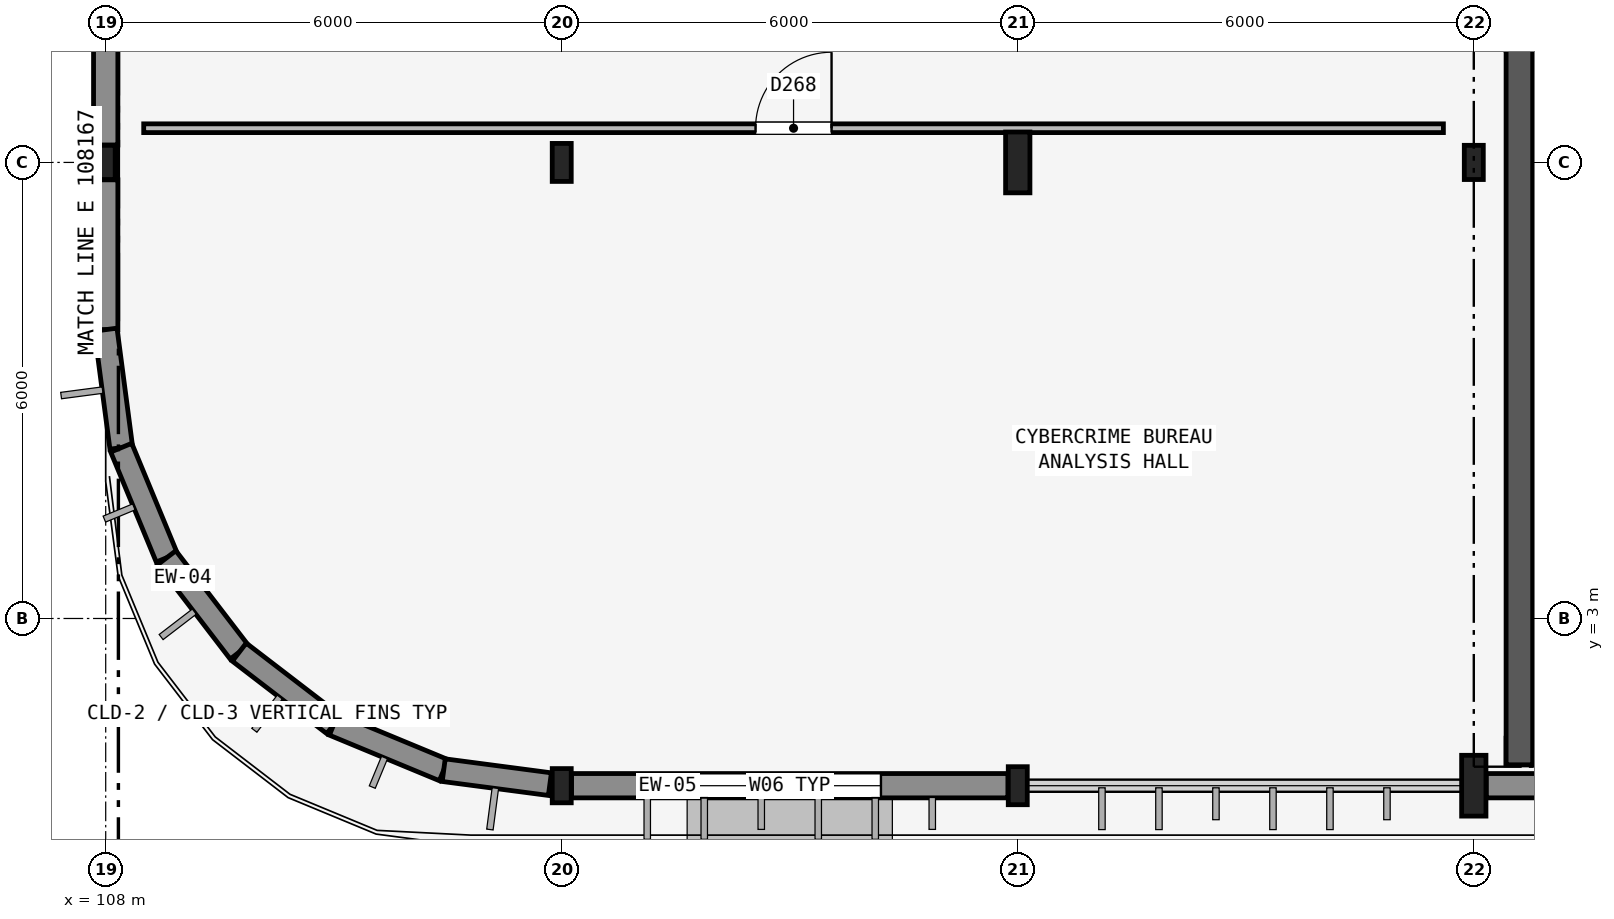
"""IFC4 building model, lengths in metres.
Left out: names, types, materials, properties, quantities, classifications, styles, units other than length and angle.
Written with IfcOpenShell. Run it as: python <this file> out.ifc"""

import sys

from ifc_helpers import new_model, si_unit, direction, frame, frame_2d, origin, origin_2d, place, context, subcontext, project, spatial, rectangle, i_section, extrude, element, fill, save


model = new_model("IFC4")
c1 = context("Model", 3, precision=1e-05, world=origin(), true_north=direction((0.0, 1.0)))
c2 = subcontext(c1, "Body", "Model", "MODEL_VIEW")
j1 = project(units=[si_unit("LENGTHUNIT", "METRE"), si_unit("PLANEANGLEUNIT", "RADIAN")], contexts=[c1])
p1 = place(None, origin())
s1 = spatial("IfcSite", under=j1, at=p1, CompositionType="ELEMENT")
p2 = place(p1, origin())
s2 = spatial("IfcBuilding", under=s1, at=p2, CompositionType="ELEMENT")
p3 = place(p2, frame((0.0, 0.0, 18.0)))
s3 = spatial("IfcBuildingStorey", under=s2, at=p3, CompositionType="ELEMENT", Elevation=18.0)
for number, where, z_axis, x_axis in (
    (1, (108.0, 9.0, 0.0), (0.0, 0.0, 1.0), (1.0, 0.0, 0.0)),
    (2, (114.0, 0.8, 0.0), (0.0, 0.0, 1.0), (1.0, 0.0, 0.0)),
):
    element("IfcColumn", number, at=place(p3, frame(where, z_axis=z_axis, x_axis=x_axis)), inside=s3, PredefinedType="COLUMN", context=c2, shape_type="SweptSolid", body=[
        extrude(i_section(OverallWidth=0.25, OverallDepth=0.45, WebThickness=0.011, FlangeThickness=0.014, FilletRadius=0.015, at=origin_2d()), origin(), (0.0, 0.0, 1.0), 4.2),
    ])
for number, where, z_axis, x_axis in (
    (3, (114.0, 9.0, 0.0), (0.0, 0.0, 1.0), (1.0, 0.0, 0.0)),
    (4, (120.0, 0.8, 0.0), (0.0, 0.0, 1.0), (1.0, 0.0, 0.0)),
):
    element("IfcColumn", number, at=place(p3, frame(where, z_axis=z_axis, x_axis=x_axis)), inside=s3, PredefinedType="COLUMN", context=c2, shape_type="SweptSolid", body=[
        extrude(i_section(OverallWidth=0.25, OverallDepth=0.5, WebThickness=0.01, FlangeThickness=0.015, FilletRadius=0.015, at=origin_2d()), origin(), (0.0, 0.0, 1.0), 4.2),
    ])
for number, where, z_axis, x_axis in (
    (5, (120.0, 9.0, 0.0), (0.0, 0.0, 1.0), (1.0, 0.0, 0.0)),
    (6, (126.0, 0.8, 0.0), (0.0, 0.0, 1.0), (1.0, 0.0, 0.0)),
):
    element("IfcColumn", number, at=place(p3, frame(where, z_axis=z_axis, x_axis=x_axis)), inside=s3, PredefinedType="COLUMN", context=c2, shape_type="SweptSolid", body=[
        extrude(i_section(OverallWidth=0.32, OverallDepth=0.8, WebThickness=0.016, FlangeThickness=0.028, at=origin_2d()), origin(), (0.0, 0.0, 1.0), 4.2),
    ])
p4 = place(p3, frame((126.0, 9.0, 0.0), z_axis=(0.0, 0.0, 1.0), x_axis=(1.0, 0.0, 0.0)))
e7 = element("IfcColumn", 7, at=p4, inside=s3, PredefinedType="COLUMN", context=c2, shape_type="SweptSolid", body=[
    extrude(i_section(OverallWidth=0.25, OverallDepth=0.45, WebThickness=0.011, FlangeThickness=0.014, FilletRadius=0.015, at=origin_2d()), origin(), (0.0, 0.0, 1.0), 4.2),
])
p5 = place(p3, frame((114.129, 0.8, 0.0), z_axis=(0.0, 0.0, 1.0), x_axis=(1.0, 0.0, 0.0)))
e8 = element("IfcWall", 8, at=p5, inside=s3, PredefinedType="SOLIDWALL", context=c2, shape_type="SweptSolid", body=[
    extrude(rectangle(XDim=5.742, YDim=0.32, at=frame_2d((2.871, 0.0))), origin(), (0.0, 0.0, 1.0), 3.39),
])
p6 = place(p5, frame((1.671, 0.0, 1.1)))
e9 = element("IfcOpeningElement", 9, at=p6, cuts=e8, PredefinedType="OPENING", context=c2, shape_type="SweptSolid", body=[
    extrude(rectangle(XDim=2.4, YDim=1.2, at=frame_2d((1.2, 0.6))), frame((0.0, 0.17, 0.0), z_axis=(0.0, -1.0, 0.0), x_axis=(1.0, 0.0, 0.0)), (0.0, 0.0, 1.0), 0.34),
])
p7 = place(p3, frame((126.164, 0.8, 0.0), z_axis=(0.0, 0.0, 1.0), x_axis=(1.0, 0.0, 0.0)))
e10 = element("IfcWall", 10, at=p7, inside=s3, PredefinedType="SOLIDWALL", context=c2, shape_type="SweptSolid", body=[
    extrude(rectangle(XDim=5.707, YDim=0.32, at=frame_2d((2.854, 0.0))), origin(), (0.0, 0.0, 1.0), 3.39),
])
p8 = place(p3, frame((108.0, 6.8, 0.0), z_axis=(0.0, 0.0, 1.0), x_axis=(0.0, 1.0, 0.0)))
e11 = element("IfcWall", 11, at=p8, inside=s3, PredefinedType="SOLIDWALL", context=c2, shape_type="SweptSolid", body=[
    extrude(rectangle(XDim=1.971, YDim=0.32, at=frame_2d((0.985, 0.0))), origin(), (0.0, 0.0, 1.0), 3.44),
])
p9 = place(p3, frame((108.0, 9.229, 0.0), z_axis=(0.0, 0.0, 1.0), x_axis=(0.0, 1.0, 0.0)))
e12 = element("IfcWall", 12, at=p9, inside=s3, PredefinedType="SOLIDWALL", context=c2, shape_type="SweptSolid", body=[
    extrude(rectangle(XDim=5.517, YDim=0.32, at=frame_2d((2.759, 0.0))), origin(), (0.0, 0.0, 1.0), 3.44),
])
p10 = place(p9, frame((1.708, 0.0, 0.9)))
e13 = element("IfcOpeningElement", 13, at=p10, cuts=e12, PredefinedType="OPENING", context=c2, shape_type="SweptSolid", body=[
    extrude(rectangle(XDim=2.1, YDim=1.5, at=frame_2d((1.05, 0.75))), frame((0.0, 0.17, 0.0), z_axis=(0.0, -1.0, 0.0), x_axis=(1.0, 0.0, 0.0)), (0.0, 0.0, 1.0), 0.34),
])
p11 = place(p3, frame((108.0, 6.8, 0.0), z_axis=(0.0, 0.0, 1.0), x_axis=(0.130458544462, -0.991453765022, 0.0)))
e14 = element("IfcWall", 14, at=p11, inside=s3, PredefinedType="SOLIDWALL", context=c2, shape_type="SweptSolid", body=[
    extrude(rectangle(XDim=1.566, YDim=0.3, at=frame_2d((0.783, 0.0))), origin(), (0.0, 0.0, 1.0), 3.895),
])
p12 = place(p3, frame((108.204, 5.247, 0.0), z_axis=(0.0, 0.0, 1.0), x_axis=(0.382677606907, -0.923881945474, 0.0)))
e15 = element("IfcWall", 15, at=p12, inside=s3, PredefinedType="SOLIDWALL", context=c2, shape_type="SweptSolid", body=[
    extrude(rectangle(XDim=1.566, YDim=0.3, at=frame_2d((0.783, 0.0))), origin(), (0.0, 0.0, 1.0), 3.895),
])
for number, where, z_axis, x_axis in (
    (16, (108.804, 3.8, 0.0), (0.0, 0.0, 1.0), (0.609, -0.793, 0.0)),
    (17, (109.757, 2.557, 0.0), (0.0, 0.0, 1.0), (0.793, -0.609, 0.0)),
):
    element("IfcWall", number, at=place(p3, frame(where, z_axis=z_axis, x_axis=x_axis)), inside=s3, PredefinedType="SOLIDWALL", context=c2, shape_type="SweptSolid", body=[
        extrude(rectangle(XDim=1.566, YDim=0.3, at=frame_2d((0.783, 0.0))), origin(), (0.0, 0.0, 1.0), 3.895),
    ])
p13 = place(p3, frame((111.0, 1.604, 0.0), z_axis=(0.0, 0.0, 1.0), x_axis=(0.923881945474, -0.382677606907, 0.0)))
e18 = element("IfcWall", 18, at=p13, inside=s3, PredefinedType="SOLIDWALL", context=c2, shape_type="SweptSolid", body=[
    extrude(rectangle(XDim=1.566, YDim=0.3, at=frame_2d((0.783, 0.0))), origin(), (0.0, 0.0, 1.0), 3.895),
])
p14 = place(p3, frame((112.447, 1.004, 0.0), z_axis=(0.0, 0.0, 1.0), x_axis=(0.991451936358, -0.130472441118, 0.0)))
e19 = element("IfcWall", 19, at=p14, inside=s3, PredefinedType="SOLIDWALL", context=c2, shape_type="SweptSolid", body=[
    extrude(rectangle(XDim=1.409, YDim=0.3, at=frame_2d((0.705, 0.0))), origin(), (0.0, 0.0, 1.0), 3.39),
])
p15 = place(p3, frame((126.425, 1.25, 0.0), z_axis=(0.0, 0.0, 1.0), x_axis=(1.0, 0.0, 0.0)))
e20 = element("IfcWall", 20, at=p15, inside=s3, PredefinedType="SHEAR", context=c2, shape_type="SweptSolid", body=[
    extrude(rectangle(XDim=5.15, YDim=0.35, at=frame_2d((2.575, 0.0))), origin(), (0.0, 0.0, 1.0), 4.06),
])
p16 = place(p3, frame((126.6, 10.825, 0.0), z_axis=(0.0, 0.0, 1.0), x_axis=(0.0, -1.0, 0.0)))
e21 = element("IfcWall", 21, at=p16, inside=s3, PredefinedType="SHEAR", context=c2, shape_type="SweptSolid", body=[
    extrude(rectangle(XDim=9.75, YDim=0.35, at=frame_2d((4.875, 0.0))), origin(), (0.0, 0.0, 1.0), 4.06),
])
p17 = place(p3, frame((108.5, 9.45, 0.0), z_axis=(0.0, 0.0, 1.0), x_axis=(1.0, 0.0, 0.0)))
e22 = element("IfcWall", 22, at=p17, inside=s3, PredefinedType="PARTITIONING", context=c2, shape_type="SweptSolid", body=[
    extrude(rectangle(XDim=17.1, YDim=0.115, at=frame_2d((8.55, 0.0))), origin(), (0.0, 0.0, 1.0), 3.44),
])
p18 = place(p17, frame((8.05, 0.0, 0.0)))
e23 = element("IfcOpeningElement", 23, at=p18, cuts=e22, PredefinedType="OPENING", context=c2, shape_type="SweptSolid", body=[
    extrude(rectangle(XDim=1.0, YDim=2.15, at=frame_2d((0.5, 1.075))), frame((0.0, 0.067, 0.0), z_axis=(0.0, -1.0, 0.0), x_axis=(1.0, 0.0, 0.0)), (0.0, 0.0, 1.0), 0.135),
])
p19 = place(p6, origin())
e24 = element("IfcWindow", 24, at=p19, inside=s3, PartitioningType="SINGLE_PANEL", PredefinedType="WINDOW", context=c2, shape_type="SweptSolid", body=[
    extrude(rectangle(XDim=2.4, YDim=1.2, at=frame_2d((1.2, 0.6))), frame((0.0, 0.03, 0.0), z_axis=(0.0, -1.0, 0.0), x_axis=(1.0, 0.0, 0.0)), (0.0, 0.0, 1.0), 0.06),
])
fill(e9, e24)
p20 = place(p18, origin())
e25 = element("IfcDoor", 25, at=p20, inside=s3, OperationType="SINGLE_SWING_RIGHT", PredefinedType="DOOR", context=c2, shape_type="SweptSolid", body=[
    extrude(rectangle(XDim=1.0, YDim=2.15, at=frame_2d((0.5, 1.075))), frame((0.0, 0.025, 0.0), z_axis=(0.0, -1.0, 0.0), x_axis=(1.0, 0.0, 0.0)), (0.0, 0.0, 1.0), 0.05),
])
fill(e23, e25)
save(model, sys.argv[1])
